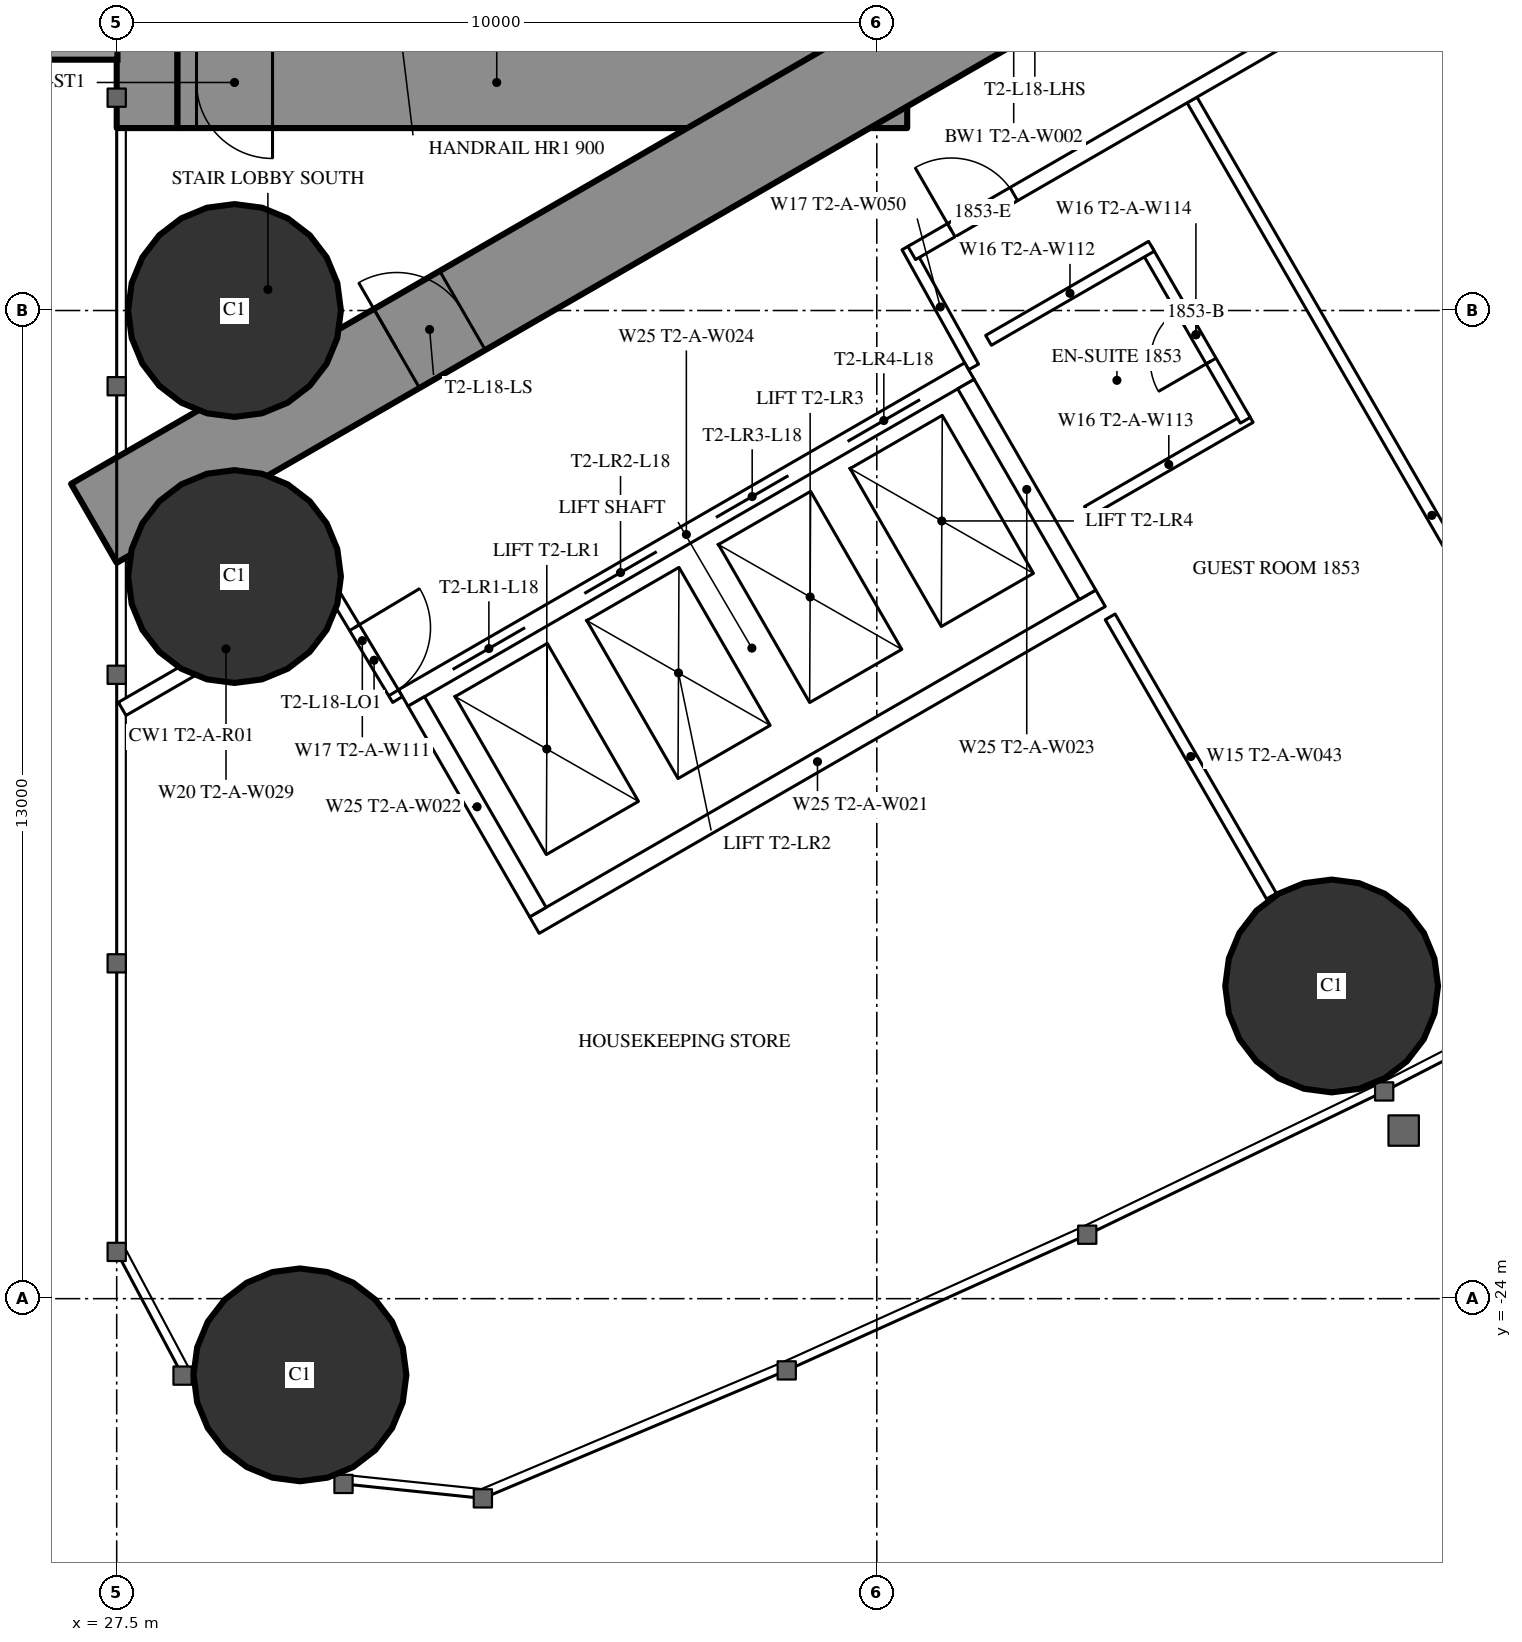
"""IFC4 building model, lengths in metres.
Left out: names, types, materials, properties, quantities, classifications, styles, units other than length and angle.
Written with IfcOpenShell. Run it as: python <this file> out.ifc"""

import sys

from ifc_helpers import new_model, si_unit, direction, frame, frame_2d, origin, origin_2d, place, context, subcontext, project, spatial, rectangle, hollow_circle, extrude, element, fill, save


model = new_model("IFC4")
c1 = context("Model", 3, precision=1e-05, world=origin(), true_north=direction((0.0, 1.0)))
c2 = subcontext(c1, "Body", "Model", "MODEL_VIEW")
j1 = project(units=[si_unit("LENGTHUNIT", "METRE"), si_unit("PLANEANGLEUNIT", "RADIAN")], contexts=[c1])
p1 = place(None, origin())
s1 = spatial("IfcSite", under=j1, at=p1, CompositionType="ELEMENT")
p2 = place(p1, origin())
s2 = spatial("IfcBuilding", under=s1, at=p2, CompositionType="ELEMENT")
p3 = place(p2, frame((0.0, 0.0, 70.5)))
s3 = spatial("IfcBuildingStorey", under=s2, at=p3, CompositionType="ELEMENT", Elevation=70.5)
for number, where, z_axis, x_axis in (
    (1, (29.911, -25.002, 0.0), (0.0, 0.0, 1.0), (1.0, 0.0, 0.0)),
    (2, (29.05, -11.0, 0.0), (0.0, 0.0, 1.0), (1.0, 0.0, 0.0)),
    (3, (29.05, -14.5, 0.0), (0.0, 0.0, 1.0), (1.0, 0.0, 0.0)),
    (4, (43.484, -19.886, 0.0), (0.0, 0.0, 1.0), (1.0, 0.0, 0.0)),
):
    element("IfcColumn", number, at=place(p3, frame(where, z_axis=z_axis, x_axis=x_axis)), inside=s3, PredefinedType="COLUMN", context=c2, shape_type="SweptSolid", body=[
        extrude(hollow_circle(Radius=1.4, WallThickness=0.12, at=origin_2d()), origin(), (0.0, 0.0, 1.0), 3.5),
    ])
p4 = place(p3, frame((27.9, -8.6, 0.0), z_axis=(0.0, 0.0, 1.0), x_axis=(0.0, 1.0, 0.0)))
e5 = element("IfcWall", 5, at=p4, inside=s3, PredefinedType="SHEAR", context=c2, shape_type="SweptSolid", body=[
    extrude(rectangle(XDim=17.2, YDim=0.8, at=frame_2d((8.6, 0.0))), origin(), (0.0, 0.0, 1.0), 3.5),
])
p5 = place(p4, frame((2.45, 0.0, 0.6)))
e6 = element("IfcOpeningElement", 6, at=p5, cuts=e5, PredefinedType="OPENING", context=c2, shape_type="SweptSolid", body=[
    extrude(rectangle(XDim=0.6, YDim=2.1, at=frame_2d((0.3, 1.05))), frame((0.0, 0.41, 0.0), z_axis=(0.0, -1.0, 0.0), x_axis=(1.0, 0.0, 0.0)), (0.0, 0.0, 1.0), 0.82),
])
p6 = place(p4, frame((14.15, 0.0, 0.6)))
e7 = element("IfcOpeningElement", 7, at=p6, cuts=e5, PredefinedType="OPENING", context=c2, shape_type="SweptSolid", body=[
    extrude(rectangle(XDim=0.6, YDim=2.1, at=frame_2d((0.3, 1.05))), frame((0.0, 0.41, 0.0), z_axis=(0.0, -1.0, 0.0), x_axis=(1.0, 0.0, 0.0)), (0.0, 0.0, 1.0), 0.82),
])
p7 = place(p3, frame((37.3, -8.6, 0.0), z_axis=(0.0, 0.0, 1.0), x_axis=(0.0, 1.0, 0.0)))
e8 = element("IfcWall", 8, at=p7, inside=s3, PredefinedType="SHEAR", context=c2, shape_type="SweptSolid", body=[
    extrude(rectangle(XDim=17.2, YDim=1.2, at=frame_2d((8.6, 0.0))), origin(), (0.0, 0.0, 1.0), 3.5),
])
p8 = place(p7, frame((7.7, 0.0, 0.0)))
e9 = element("IfcOpeningElement", 9, at=p8, cuts=e8, PredefinedType="OPENING", context=c2, shape_type="SweptSolid", body=[
    extrude(rectangle(XDim=1.8, YDim=2.2, at=frame_2d((0.9, 1.1))), frame((0.0, 0.61, 0.0), z_axis=(0.0, -1.0, 0.0), x_axis=(1.0, 0.0, 0.0)), (0.0, 0.0, 1.0), 1.22),
])
p9 = place(p3, frame((28.3, -8.0, 0.0), z_axis=(0.0, 0.0, 1.0), x_axis=(1.0, 0.0, 0.0)))
e10 = element("IfcWall", 10, at=p9, inside=s3, PredefinedType="SHEAR", context=c2, shape_type="SweptSolid", body=[
    extrude(rectangle(XDim=8.4, YDim=1.2, at=frame_2d((4.2, 0.0))), origin(), (0.0, 0.0, 1.0), 3.5),
])
p10 = place(p9, frame((0.25, 0.0, 0.0)))
e11 = element("IfcOpeningElement", 11, at=p10, cuts=e10, PredefinedType="OPENING", context=c2, shape_type="SweptSolid", body=[
    extrude(rectangle(XDim=1.0, YDim=2.2, at=frame_2d((0.5, 1.1))), frame((0.0, 0.61, 0.0), z_axis=(0.0, -1.0, 0.0), x_axis=(1.0, 0.0, 0.0)), (0.0, 0.0, 1.0), 1.22),
])
p11 = place(p3, frame((27.2, -13.8, 0.0), z_axis=(0.0, 0.0, 1.0), x_axis=(0.866027159892, 0.499996958321, 0.0)))
e12 = element("IfcWall", 12, at=p11, inside=s3, PredefinedType="SHEAR", context=c2, shape_type="SweptSolid", body=[
    extrude(rectangle(XDim=27.947, YDim=1.2, at=frame_2d((13.973, 0.0))), origin(), (0.0, 0.0, 1.0), 3.5),
])
p12 = place(p11, frame((4.6, 0.0, 0.0)))
e13 = element("IfcOpeningElement", 13, at=p12, cuts=e12, PredefinedType="OPENING", context=c2, shape_type="SweptSolid", body=[
    extrude(rectangle(XDim=1.0, YDim=2.2, at=frame_2d((0.5, 1.1))), frame((0.0, 0.61, 0.0), z_axis=(0.0, -1.0, 0.0), x_axis=(1.0, 0.0, 0.0)), (0.0, 0.0, 1.0), 1.22),
])
p13 = place(p11, frame((13.395, 0.0, 0.0)))
e14 = element("IfcOpeningElement", 14, at=p13, cuts=e12, PredefinedType="OPENING", context=c2, shape_type="SweptSolid", body=[
    extrude(rectangle(XDim=1.8, YDim=2.2, at=frame_2d((0.9, 1.1))), frame((0.0, 0.61, 0.0), z_axis=(0.0, -1.0, 0.0), x_axis=(1.0, 0.0, 0.0)), (0.0, 0.0, 1.0), 1.22),
])
p14 = place(p3, frame((41.647, -8.23, 0.0), z_axis=(0.0, 0.0, 1.0), x_axis=(0.49998590462, -0.866033541603, 0.0)))
e15 = element("IfcWall", 15, at=p14, inside=s3, PredefinedType="PARTITIONING", context=c2, shape_type="SweptSolid", body=[
    extrude(rectangle(XDim=12.621, YDim=0.15, at=frame_2d((6.311, 0.0))), origin(), (0.0, 0.0, 1.0), 3.25),
])
p15 = place(p3, frame((40.57, -15.03, 0.0), z_axis=(0.0, 0.0, 1.0), x_axis=(0.500012993597, -0.866017901798, 0.0)))
e16 = element("IfcWall", 16, at=p15, inside=s3, PredefinedType="PARTITIONING", context=c2, shape_type="SweptSolid", body=[
    extrude(rectangle(XDim=4.243, YDim=0.15, at=frame_2d((2.122, 0.0))), origin(), (0.0, 0.0, 1.0), 3.25),
])
p16 = place(p3, frame((27.572, -16.241, 0.0), z_axis=(0.0, 0.0, 1.0), x_axis=(0.866029654818, 0.499992636921, 0.0)))
e17 = element("IfcWall", 17, at=p16, inside=s3, PredefinedType="PARTITIONING", context=c2, shape_type="SweptSolid", body=[
    extrude(rectangle(XDim=3.155, YDim=0.2, at=frame_2d((1.577, 0.0))), origin(), (0.0, 0.0, 1.0), 3.25),
])
p17 = place(p3, frame((38.773, -11.742, 0.0), z_axis=(0.0, 0.0, 1.0), x_axis=(-0.485528096672, 0.8742210632, 0.0)))
e18 = element("IfcWall", 18, at=p17, inside=s3, PredefinedType="PARTITIONING", context=c2, shape_type="SweptSolid", body=[
    extrude(rectangle(XDim=1.805, YDim=0.15, at=frame_2d((0.903, 0.0))), origin(), (0.0, 0.0, 1.0), 3.25),
])
p18 = place(p3, frame((30.267, -14.569, 0.0), z_axis=(0.0, 0.0, 1.0), x_axis=(0.514336634837, -0.857588377991, 0.0)))
e19 = element("IfcWall", 19, at=p18, inside=s3, PredefinedType="PARTITIONING", context=c2, shape_type="SweptSolid", body=[
    extrude(rectangle(XDim=1.805, YDim=0.15, at=frame_2d((0.903, 0.0))), origin(), (0.0, 0.0, 1.0), 3.25),
])
p19 = place(p18, frame((0.703, 0.0, 0.0)))
e20 = element("IfcOpeningElement", 20, at=p19, cuts=e19, PredefinedType="OPENING", context=c2, shape_type="SweptSolid", body=[
    extrude(rectangle(XDim=1.0, YDim=2.2, at=frame_2d((0.5, 1.1))), frame((0.0, 0.085, 0.0), z_axis=(0.0, -1.0, 0.0), x_axis=(1.0, 0.0, 0.0)), (0.0, 0.0, 1.0), 0.17),
])
p20 = place(p3, frame((37.96, -10.243, 0.0), z_axis=(0.0, 0.0, 1.0), x_axis=(0.866030548046, 0.499991089772, 0.0)))
e21 = element("IfcWall", 21, at=p20, inside=s3, PredefinedType="PARTITIONING", context=c2, shape_type="SweptSolid", body=[
    extrude(rectangle(XDim=12.849, YDim=0.2, at=frame_2d((6.425, 0.0))), origin(), (0.0, 0.0, 1.0), 3.25),
])
p21 = place(p20, frame((8.949, 0.0, 0.0)))
e22 = element("IfcOpeningElement", 22, at=p21, cuts=e21, PredefinedType="OPENING", context=c2, shape_type="SweptSolid", body=[
    extrude(rectangle(XDim=0.95, YDim=2.2, at=frame_2d((0.475, 1.1))), frame((0.0, 0.11, 0.0), z_axis=(0.0, -1.0, 0.0), x_axis=(1.0, 0.0, 0.0)), (0.0, 0.0, 1.0), 0.22),
])
p22 = place(p20, frame((0.6, 0.0, 0.0)))
e23 = element("IfcOpeningElement", 23, at=p22, cuts=e21, PredefinedType="OPENING", context=c2, shape_type="SweptSolid", body=[
    extrude(rectangle(XDim=0.95, YDim=2.2, at=frame_2d((0.475, 1.1))), frame((0.0, 0.11, 0.0), z_axis=(0.0, -1.0, 0.0), x_axis=(1.0, 0.0, 0.0)), (0.0, 0.0, 1.0), 0.22),
])
p23 = place(p3, frame((40.27, -13.644, 0.0), z_axis=(0.0, 0.0, 1.0), x_axis=(0.866031185235, 0.4999899861, 0.0)))
e24 = element("IfcWall", 24, at=p23, inside=s3, PredefinedType="PARTITIONING", context=c2, shape_type="SweptSolid", body=[
    extrude(rectangle(XDim=2.475, YDim=0.15, at=frame_2d((1.238, 0.0))), origin(), (0.0, 0.0, 1.0), 3.25),
])
p24 = place(p3, frame((41.048, -10.193, 0.0), z_axis=(0.0, 0.0, 1.0), x_axis=(0.500047596559, -0.865997922154, 0.0)))
e25 = element("IfcWall", 25, at=p24, inside=s3, PredefinedType="PARTITIONING", context=c2, shape_type="SweptSolid", body=[
    extrude(rectangle(XDim=2.6, YDim=0.15, at=frame_2d((1.3, 0.0))), origin(), (0.0, 0.0, 1.0), 3.25),
])
p25 = place(p24, frame((0.9, 0.0, 0.0)))
e26 = element("IfcOpeningElement", 26, at=p25, cuts=e25, PredefinedType="OPENING", context=c2, shape_type="SweptSolid", body=[
    extrude(rectangle(XDim=0.8, YDim=2.2, at=frame_2d((0.4, 1.1))), frame((0.0, 0.085, 0.0), z_axis=(0.0, -1.0, 0.0), x_axis=(1.0, 0.0, 0.0)), (0.0, 0.0, 1.0), 0.17),
])
p26 = place(p3, frame((38.97, -11.393, 0.0), z_axis=(0.0, 0.0, 1.0), x_axis=(0.866031185235, 0.4999899861, 0.0)))
e27 = element("IfcWall", 27, at=p26, inside=s3, PredefinedType="PARTITIONING", context=c2, shape_type="SweptSolid", body=[
    extrude(rectangle(XDim=2.475, YDim=0.15, at=frame_2d((1.238, 0.0))), origin(), (0.0, 0.0, 1.0), 3.25),
])
p27 = place(p3, frame((31.271, -16.097, 0.0), z_axis=(0.0, 0.0, 1.0), x_axis=(0.86604045752, 0.499973925258, 0.0)))
e28 = element("IfcWall", 28, at=p27, inside=s3, PredefinedType="PARTITIONING", context=c2, shape_type="SweptSolid", body=[
    extrude(rectangle(XDim=8.6, YDim=0.25, at=frame_2d((4.3, 0.0))), origin(), (0.0, 0.0, 1.0), 3.25),
])
p28 = place(p27, frame((0.75, 0.0, 0.0)))
e29 = element("IfcOpeningElement", 29, at=p28, cuts=e28, PredefinedType="OPENING", context=c2, shape_type="SweptSolid", body=[
    extrude(rectangle(XDim=1.1, YDim=2.2, at=frame_2d((0.55, 1.1))), frame((0.0, 0.135, 0.0), z_axis=(0.0, -1.0, 0.0), x_axis=(1.0, 0.0, 0.0)), (0.0, 0.0, 1.0), 0.27),
])
p29 = place(p27, frame((2.75, 0.0, 0.0)))
e30 = element("IfcOpeningElement", 30, at=p29, cuts=e28, PredefinedType="OPENING", context=c2, shape_type="SweptSolid", body=[
    extrude(rectangle(XDim=1.1, YDim=2.2, at=frame_2d((0.55, 1.1))), frame((0.0, 0.135, 0.0), z_axis=(0.0, -1.0, 0.0), x_axis=(1.0, 0.0, 0.0)), (0.0, 0.0, 1.0), 0.27),
])
p30 = place(p27, frame((4.75, 0.0, 0.0)))
e31 = element("IfcOpeningElement", 31, at=p30, cuts=e28, PredefinedType="OPENING", context=c2, shape_type="SweptSolid", body=[
    extrude(rectangle(XDim=1.1, YDim=2.2, at=frame_2d((0.55, 1.1))), frame((0.0, 0.135, 0.0), z_axis=(0.0, -1.0, 0.0), x_axis=(1.0, 0.0, 0.0)), (0.0, 0.0, 1.0), 0.27),
])
p31 = place(p27, frame((6.75, 0.0, 0.0)))
e32 = element("IfcOpeningElement", 32, at=p31, cuts=e28, PredefinedType="OPENING", context=c2, shape_type="SweptSolid", body=[
    extrude(rectangle(XDim=1.1, YDim=2.2, at=frame_2d((0.55, 1.1))), frame((0.0, 0.135, 0.0), z_axis=(0.0, -1.0, 0.0), x_axis=(1.0, 0.0, 0.0)), (0.0, 0.0, 1.0), 0.27),
])
p32 = place(p3, frame((32.996, -19.086, 0.0), z_axis=(0.0, 0.0, 1.0), x_axis=(0.866028165386, 0.499995216735, 0.0)))
e33 = element("IfcWall", 33, at=p32, inside=s3, PredefinedType="PARTITIONING", context=c2, shape_type="SweptSolid", body=[
    extrude(rectangle(XDim=8.6, YDim=0.25, at=frame_2d((4.3, 0.0))), origin(), (0.0, 0.0, 1.0), 3.25),
])
for number, where, z_axis, x_axis in (
    (34, (31.441, -16.143, 0.0), (0.0, 0.0, 1.0), (0.5, -0.866, 0.0)),
    (35, (38.673, -11.968, 0.0), (0.0, 0.0, 1.0), (0.5, -0.866, 0.0)),
):
    element("IfcWall", number, at=place(p3, frame(where, z_axis=z_axis, x_axis=x_axis)), inside=s3, PredefinedType="PARTITIONING", context=c2, shape_type="SweptSolid", body=[
        extrude(rectangle(XDim=3.201, YDim=0.25, at=frame_2d((1.6, 0.0))), origin(), (0.0, 0.0, 1.0), 3.25),
    ])
p33 = place(p25, origin())
e36 = element("IfcDoor", 36, at=p33, inside=s3, OperationType="SINGLE_SWING_RIGHT", PredefinedType="DOOR", context=c2, shape_type="SweptSolid", body=[
    extrude(rectangle(XDim=0.8, YDim=2.2, at=frame_2d((0.4, 1.1))), frame((0.0, 0.025, 0.0), z_axis=(0.0, -1.0, 0.0), x_axis=(1.0, 0.0, 0.0)), (0.0, 0.0, 1.0), 0.05),
])
fill(e26, e36)
p34 = place(p22, origin())
e37 = element("IfcDoor", 37, at=p34, inside=s3, OperationType="SINGLE_SWING_LEFT", PredefinedType="DOOR", context=c2, shape_type="SweptSolid", body=[
    extrude(rectangle(XDim=0.95, YDim=2.2, at=frame_2d((0.475, 1.1))), frame((0.0, 0.025, 0.0), z_axis=(0.0, -1.0, 0.0), x_axis=(1.0, 0.0, 0.0)), (0.0, 0.0, 1.0), 0.05),
])
fill(e23, e37)
p35 = place(p19, origin())
e38 = element("IfcDoor", 38, at=p35, inside=s3, OperationType="SINGLE_SWING_LEFT", PredefinedType="DOOR", context=c2, shape_type="SweptSolid", body=[
    extrude(rectangle(XDim=1.0, YDim=2.2, at=frame_2d((0.5, 1.1))), frame((0.0, 0.025, 0.0), z_axis=(0.0, -1.0, 0.0), x_axis=(1.0, 0.0, 0.0)), (0.0, 0.0, 1.0), 0.05),
])
fill(e20, e38)
p36 = place(p12, origin())
e39 = element("IfcDoor", 39, at=p36, inside=s3, OperationType="SINGLE_SWING_LEFT", PredefinedType="DOOR", context=c2, shape_type="SweptSolid", body=[
    extrude(rectangle(XDim=1.0, YDim=2.2, at=frame_2d((0.5, 1.1))), frame((0.0, 0.025, 0.0), z_axis=(0.0, -1.0, 0.0), x_axis=(1.0, 0.0, 0.0)), (0.0, 0.0, 1.0), 0.05),
])
fill(e13, e39)
p37 = place(p10, origin())
e40 = element("IfcDoor", 40, at=p37, inside=s3, OperationType="SINGLE_SWING_RIGHT", PredefinedType="DOOR", context=c2, shape_type="SweptSolid", body=[
    extrude(rectangle(XDim=1.0, YDim=2.2, at=frame_2d((0.5, 1.1))), frame((0.0, 0.025, 0.0), z_axis=(0.0, -1.0, 0.0), x_axis=(1.0, 0.0, 0.0)), (0.0, 0.0, 1.0), 0.05),
])
fill(e11, e40)
p38 = place(p28, origin())
e41 = element("IfcDoor", 41, at=p38, inside=s3, OperationType="DOUBLE_DOOR_SLIDING", PredefinedType="USERDEFINED", context=c2, shape_type="SweptSolid", body=[
    extrude(rectangle(XDim=1.1, YDim=2.2, at=frame_2d((0.55, 1.1))), frame((0.0, 0.025, 0.0), z_axis=(0.0, -1.0, 0.0), x_axis=(1.0, 0.0, 0.0)), (0.0, 0.0, 1.0), 0.05),
])
fill(e29, e41)
p39 = place(p29, origin())
e42 = element("IfcDoor", 42, at=p39, inside=s3, OperationType="DOUBLE_DOOR_SLIDING", PredefinedType="USERDEFINED", context=c2, shape_type="SweptSolid", body=[
    extrude(rectangle(XDim=1.1, YDim=2.2, at=frame_2d((0.55, 1.1))), frame((0.0, 0.025, 0.0), z_axis=(0.0, -1.0, 0.0), x_axis=(1.0, 0.0, 0.0)), (0.0, 0.0, 1.0), 0.05),
])
fill(e30, e42)
p40 = place(p30, origin())
e43 = element("IfcDoor", 43, at=p40, inside=s3, OperationType="DOUBLE_DOOR_SLIDING", PredefinedType="USERDEFINED", context=c2, shape_type="SweptSolid", body=[
    extrude(rectangle(XDim=1.1, YDim=2.2, at=frame_2d((0.55, 1.1))), frame((0.0, 0.025, 0.0), z_axis=(0.0, -1.0, 0.0), x_axis=(1.0, 0.0, 0.0)), (0.0, 0.0, 1.0), 0.05),
])
fill(e31, e43)
p41 = place(p31, origin())
e44 = element("IfcDoor", 44, at=p41, inside=s3, OperationType="DOUBLE_DOOR_SLIDING", PredefinedType="USERDEFINED", context=c2, shape_type="SweptSolid", body=[
    extrude(rectangle(XDim=1.1, YDim=2.2, at=frame_2d((0.55, 1.1))), frame((0.0, 0.025, 0.0), z_axis=(0.0, -1.0, 0.0), x_axis=(1.0, 0.0, 0.0)), (0.0, 0.0, 1.0), 0.05),
])
fill(e32, e44)
save(model, sys.argv[1])
